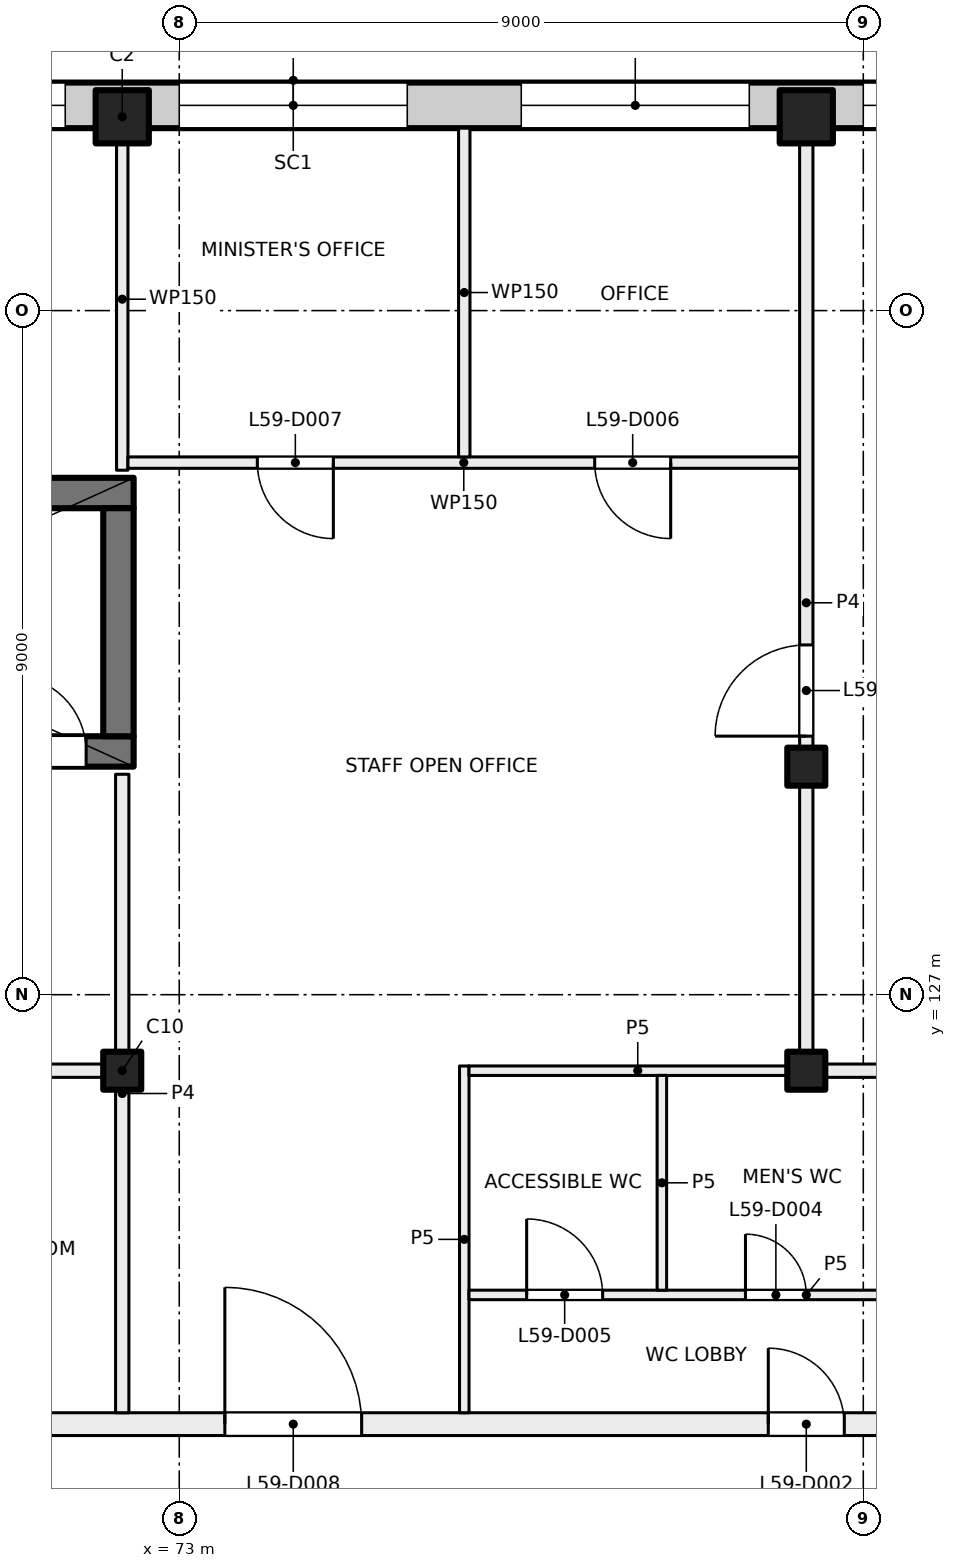
"""IFC4 building model, lengths in metres.
Left out: names, types, materials, properties, quantities, classifications, styles, units other than length and angle.
Written with IfcOpenShell. Run it as: python <this file> out.ifc"""

import sys

from ifc_helpers import new_model, si_unit, direction, frame, frame_2d, origin, origin_2d, place, context, subcontext, project, spatial, rectangle, extrude, element, fill, save


model = new_model("IFC4")
c1 = context("Model", 3, precision=1e-05, world=origin(), true_north=direction((0.0, 1.0)))
c2 = subcontext(c1, "Body", "Model", "MODEL_VIEW")
j1 = project(units=[si_unit("LENGTHUNIT", "METRE"), si_unit("PLANEANGLEUNIT", "RADIAN")], contexts=[c1])
p1 = place(None, origin())
s1 = spatial("IfcSite", under=j1, at=p1, CompositionType="ELEMENT")
p2 = place(p1, origin())
s2 = spatial("IfcBuilding", under=s1, at=p2, CompositionType="ELEMENT")
p3 = place(p2, frame((0.0, 0.0, 249.5)))
s3 = spatial("IfcBuildingStorey", under=s2, at=p3, CompositionType="ELEMENT", Elevation=249.5)
for number, where, z_axis, x_axis in (
    (1, (81.25, 130.0, 0.0), (0.0, 0.0, 1.0), (1.0, 0.0, 0.0)),
    (2, (72.25, 126.0, 0.0), (0.0, 0.0, 1.0), (1.0, 0.0, 0.0)),
    (3, (81.25, 126.0, 0.0), (0.0, 0.0, 1.0), (1.0, 0.0, 0.0)),
):
    element("IfcColumn", number, at=place(p3, frame(where, z_axis=z_axis, x_axis=x_axis)), inside=s3, PredefinedType="COLUMN", context=c2, shape_type="SweptSolid", body=[
        extrude(rectangle(XDim=0.5, YDim=0.5, at=origin_2d()), origin(), (0.0, 0.0, 1.0), 4.0),
    ])
for number, where, z_axis, x_axis in (
    (4, (72.25, 138.55, 0.0), (0.0, 0.0, 1.0), (1.0, 0.0, 0.0)),
    (5, (81.25, 138.55, 0.0), (0.0, 0.0, 1.0), (1.0, 0.0, 0.0)),
):
    element("IfcColumn", number, at=place(p3, frame(where, z_axis=z_axis, x_axis=x_axis)), inside=s3, PredefinedType="COLUMN", context=c2, shape_type="SweptSolid", body=[
        extrude(rectangle(XDim=0.7, YDim=0.7, at=origin_2d()), origin(), (0.0, 0.0, 1.0), 4.0),
    ])
p4 = place(p3, frame((63.5, 130.2, 0.0), z_axis=(0.0, 0.0, 1.0), x_axis=(1.0, 0.0, 0.0)))
e6 = element("IfcWall", 6, at=p4, inside=s3, PredefinedType="SHEAR", context=c2, shape_type="SweptSolid", body=[
    extrude(rectangle(XDim=8.9, YDim=0.4, at=frame_2d((4.45, 0.0))), origin(), (0.0, 0.0, 1.0), 4.0),
])
p5 = place(p4, frame((7.275, 0.0, 0.0)))
e7 = element("IfcOpeningElement", 7, at=p5, cuts=e6, PredefinedType="OPENING", context=c2, shape_type="SweptSolid", body=[
    extrude(rectangle(XDim=1.0, YDim=2.1, at=frame_2d((0.5, 1.05))), frame((0.0, 0.21, 0.0), z_axis=(0.0, -1.0, 0.0), x_axis=(1.0, 0.0, 0.0)), (0.0, 0.0, 1.0), 0.42),
])
p6 = place(p3, frame((64.0, 133.6, 0.0), z_axis=(0.0, 0.0, 1.0), x_axis=(1.0, 0.0, 0.0)))
e8 = element("IfcWall", 8, at=p6, inside=s3, PredefinedType="SHEAR", context=c2, shape_type="SweptSolid", body=[
    extrude(rectangle(XDim=8.4, YDim=0.4, at=frame_2d((4.2, 0.0))), origin(), (0.0, 0.0, 1.0), 4.0),
])
p7 = place(p3, frame((72.2, 130.4, 0.0), z_axis=(0.0, 0.0, 1.0), x_axis=(0.0, 1.0, 0.0)))
e9 = element("IfcWall", 9, at=p7, inside=s3, PredefinedType="SHEAR", context=c2, shape_type="SweptSolid", body=[
    extrude(rectangle(XDim=3.0, YDim=0.4, at=frame_2d((1.5, 0.0))), origin(), (0.0, 0.0, 1.0), 4.0),
])
p8 = place(p3, frame((47.07, 138.7, 0.0), z_axis=(0.0, 0.0, 1.0), x_axis=(1.0, 0.0, 0.0)))
e10 = element("IfcWall", 10, at=p8, inside=s3, PredefinedType="SOLIDWALL", context=c2, shape_type="SweptSolid", body=[
    extrude(rectangle(XDim=43.91, YDim=0.6, at=frame_2d((21.955, 0.0))), origin(), (0.0, 0.0, 1.0), 3.625),
])
p9 = place(p8, frame((3.43, 0.0, 0.9)))
e11 = element("IfcOpeningElement", 11, at=p9, cuts=e10, PredefinedType="OPENING", context=c2, shape_type="SweptSolid", body=[
    extrude(rectangle(XDim=3.0, YDim=2.4, at=frame_2d((1.5, 1.2))), frame((0.0, 0.31, 0.0), z_axis=(0.0, -1.0, 0.0), x_axis=(1.0, 0.0, 0.0)), (0.0, 0.0, 1.0), 0.62),
])
p10 = place(p8, frame((7.93, 0.0, 0.9)))
e12 = element("IfcOpeningElement", 12, at=p10, cuts=e10, PredefinedType="OPENING", context=c2, shape_type="SweptSolid", body=[
    extrude(rectangle(XDim=3.0, YDim=2.4, at=frame_2d((1.5, 1.2))), frame((0.0, 0.31, 0.0), z_axis=(0.0, -1.0, 0.0), x_axis=(1.0, 0.0, 0.0)), (0.0, 0.0, 1.0), 0.62),
])
p11 = place(p8, frame((12.43, 0.0, 0.9)))
e13 = element("IfcOpeningElement", 13, at=p11, cuts=e10, PredefinedType="OPENING", context=c2, shape_type="SweptSolid", body=[
    extrude(rectangle(XDim=3.0, YDim=2.4, at=frame_2d((1.5, 1.2))), frame((0.0, 0.31, 0.0), z_axis=(0.0, -1.0, 0.0), x_axis=(1.0, 0.0, 0.0)), (0.0, 0.0, 1.0), 0.62),
])
p12 = place(p8, frame((16.93, 0.0, 0.9)))
e14 = element("IfcOpeningElement", 14, at=p12, cuts=e10, PredefinedType="OPENING", context=c2, shape_type="SweptSolid", body=[
    extrude(rectangle(XDim=3.0, YDim=2.4, at=frame_2d((1.5, 1.2))), frame((0.0, 0.31, 0.0), z_axis=(0.0, -1.0, 0.0), x_axis=(1.0, 0.0, 0.0)), (0.0, 0.0, 1.0), 0.62),
])
p13 = place(p8, frame((21.43, 0.0, 0.9)))
e15 = element("IfcOpeningElement", 15, at=p13, cuts=e10, PredefinedType="OPENING", context=c2, shape_type="SweptSolid", body=[
    extrude(rectangle(XDim=3.0, YDim=2.4, at=frame_2d((1.5, 1.2))), frame((0.0, 0.31, 0.0), z_axis=(0.0, -1.0, 0.0), x_axis=(1.0, 0.0, 0.0)), (0.0, 0.0, 1.0), 0.62),
])
p14 = place(p8, frame((25.93, 0.0, 0.9)))
e16 = element("IfcOpeningElement", 16, at=p14, cuts=e10, PredefinedType="OPENING", context=c2, shape_type="SweptSolid", body=[
    extrude(rectangle(XDim=3.0, YDim=2.4, at=frame_2d((1.5, 1.2))), frame((0.0, 0.31, 0.0), z_axis=(0.0, -1.0, 0.0), x_axis=(1.0, 0.0, 0.0)), (0.0, 0.0, 1.0), 0.62),
])
p15 = place(p8, frame((30.43, 0.0, 0.9)))
e17 = element("IfcOpeningElement", 17, at=p15, cuts=e10, PredefinedType="OPENING", context=c2, shape_type="SweptSolid", body=[
    extrude(rectangle(XDim=3.0, YDim=2.4, at=frame_2d((1.5, 1.2))), frame((0.0, 0.31, 0.0), z_axis=(0.0, -1.0, 0.0), x_axis=(1.0, 0.0, 0.0)), (0.0, 0.0, 1.0), 0.62),
])
p16 = place(p8, frame((34.93, 0.0, 0.9)))
e18 = element("IfcOpeningElement", 18, at=p16, cuts=e10, PredefinedType="OPENING", context=c2, shape_type="SweptSolid", body=[
    extrude(rectangle(XDim=3.0, YDim=2.4, at=frame_2d((1.5, 1.2))), frame((0.0, 0.31, 0.0), z_axis=(0.0, -1.0, 0.0), x_axis=(1.0, 0.0, 0.0)), (0.0, 0.0, 1.0), 0.62),
])
p17 = place(p8, frame((39.43, 0.0, 0.9)))
e19 = element("IfcOpeningElement", 19, at=p17, cuts=e10, PredefinedType="OPENING", context=c2, shape_type="SweptSolid", body=[
    extrude(rectangle(XDim=3.0, YDim=2.4, at=frame_2d((1.5, 1.2))), frame((0.0, 0.31, 0.0), z_axis=(0.0, -1.0, 0.0), x_axis=(1.0, 0.0, 0.0)), (0.0, 0.0, 1.0), 0.62),
])
p18 = place(p3, frame((54.4, 121.35, 0.0), z_axis=(0.0, 0.0, 1.0), x_axis=(1.0, 0.0, 0.0)))
e20 = element("IfcWall", 20, at=p18, inside=s3, PredefinedType="PARTITIONING", context=c2, shape_type="SweptSolid", body=[
    extrude(rectangle(XDim=31.412, YDim=0.3, at=frame_2d((15.706, 0.0))), origin(), (0.0, 0.0, 1.0), 3.625),
])
p19 = place(p18, frame((26.35, 0.0, 0.0)))
e21 = element("IfcOpeningElement", 21, at=p19, cuts=e20, PredefinedType="OPENING", context=c2, shape_type="SweptSolid", body=[
    extrude(rectangle(XDim=1.0, YDim=2.1, at=frame_2d((0.5, 1.05))), frame((0.0, 0.16, 0.0), z_axis=(0.0, -1.0, 0.0), x_axis=(1.0, 0.0, 0.0)), (0.0, 0.0, 1.0), 0.32),
])
p20 = place(p18, frame((19.2, 0.0, 0.0)))
e22 = element("IfcOpeningElement", 22, at=p20, cuts=e20, PredefinedType="OPENING", context=c2, shape_type="SweptSolid", body=[
    extrude(rectangle(XDim=1.8, YDim=2.1, at=frame_2d((0.9, 1.05))), frame((0.0, 0.16, 0.0), z_axis=(0.0, -1.0, 0.0), x_axis=(1.0, 0.0, 0.0)), (0.0, 0.0, 1.0), 0.32),
])
p21 = place(p18, frame((15.0, 0.0, 0.0)))
e23 = element("IfcOpeningElement", 23, at=p21, cuts=e20, PredefinedType="OPENING", context=c2, shape_type="SweptSolid", body=[
    extrude(rectangle(XDim=1.2, YDim=2.1, at=frame_2d((0.6, 1.05))), frame((0.0, 0.16, 0.0), z_axis=(0.0, -1.0, 0.0), x_axis=(1.0, 0.0, 0.0)), (0.0, 0.0, 1.0), 0.32),
])
p22 = place(p18, frame((11.45, 0.0, 0.0)))
e24 = element("IfcOpeningElement", 24, at=p22, cuts=e20, PredefinedType="OPENING", context=c2, shape_type="SweptSolid", body=[
    extrude(rectangle(XDim=0.8, YDim=2.1, at=frame_2d((0.4, 1.05))), frame((0.0, 0.16, 0.0), z_axis=(0.0, -1.0, 0.0), x_axis=(1.0, 0.0, 0.0)), (0.0, 0.0, 1.0), 0.32),
])
p23 = place(p18, frame((3.515, 0.0, 0.0)))
e25 = element("IfcOpeningElement", 25, at=p23, cuts=e20, PredefinedType="OPENING", context=c2, shape_type="SweptSolid", body=[
    extrude(rectangle(XDim=1.8, YDim=2.1, at=frame_2d((0.9, 1.05))), frame((0.0, 0.16, 0.0), z_axis=(0.0, -1.0, 0.0), x_axis=(1.0, 0.0, 0.0)), (0.0, 0.0, 1.0), 0.32),
])
p24 = place(p3, frame((64.662, 126.0, 0.0), z_axis=(0.0, 0.0, 1.0), x_axis=(1.0, 0.0, 0.0)))
e26 = element("IfcWall", 26, at=p24, inside=s3, PredefinedType="PARTITIONING", context=c2, shape_type="SweptSolid", body=[
    extrude(rectangle(XDim=7.5, YDim=0.175, at=frame_2d((3.75, 0.0))), origin(), (0.0, 0.0, 1.0), 3.625),
])
p25 = place(p3, frame((72.25, 121.5, 0.0), z_axis=(0.0, 0.0, 1.0), x_axis=(0.0, 1.0, 0.0)))
e27 = element("IfcWall", 27, at=p25, inside=s3, PredefinedType="PARTITIONING", context=c2, shape_type="SweptSolid", body=[
    extrude(rectangle(XDim=8.4, YDim=0.175, at=frame_2d((4.2, 0.0))), origin(), (0.0, 0.0, 1.0), 3.625),
])
p26 = place(p3, frame((72.25, 133.9, 0.0), z_axis=(0.0, 0.0, 1.0), x_axis=(0.0, 1.0, 0.0)))
e28 = element("IfcWall", 28, at=p26, inside=s3, PredefinedType="PARTITIONING", context=c2, shape_type="SweptSolid", body=[
    extrude(rectangle(XDim=4.5, YDim=0.15, at=frame_2d((2.25, 0.0))), origin(), (0.0, 0.0, 1.0), 3.625),
])
p27 = place(p3, frame((81.162, 134.0, 0.0), z_axis=(0.0, 0.0, 1.0), x_axis=(-1.0, 0.0, 0.0)))
e29 = element("IfcWall", 29, at=p27, inside=s3, PredefinedType="PARTITIONING", context=c2, shape_type="SweptSolid", body=[
    extrude(rectangle(XDim=8.837, YDim=0.15, at=frame_2d((4.418, 0.0))), origin(), (0.0, 0.0, 1.0), 3.625),
])
p28 = place(p27, frame((1.696, 0.0, 0.0)))
e30 = element("IfcOpeningElement", 30, at=p28, cuts=e29, PredefinedType="OPENING", context=c2, shape_type="SweptSolid", body=[
    extrude(rectangle(XDim=1.0, YDim=2.1, at=frame_2d((0.5, 1.05))), frame((0.0, 0.085, 0.0), z_axis=(0.0, -1.0, 0.0), x_axis=(1.0, 0.0, 0.0)), (0.0, 0.0, 1.0), 0.17),
])
p29 = place(p27, frame((6.135, 0.0, 0.0)))
e31 = element("IfcOpeningElement", 31, at=p29, cuts=e29, PredefinedType="OPENING", context=c2, shape_type="SweptSolid", body=[
    extrude(rectangle(XDim=1.0, YDim=2.1, at=frame_2d((0.5, 1.05))), frame((0.0, 0.085, 0.0), z_axis=(0.0, -1.0, 0.0), x_axis=(1.0, 0.0, 0.0)), (0.0, 0.0, 1.0), 0.17),
])
p30 = place(p3, frame((76.75, 121.5, 0.0), z_axis=(0.0, 0.0, 1.0), x_axis=(0.0, 1.0, 0.0)))
e32 = element("IfcWall", 32, at=p30, inside=s3, PredefinedType="PARTITIONING", context=c2, shape_type="SweptSolid", body=[
    extrude(rectangle(XDim=4.562, YDim=0.125, at=frame_2d((2.281, 0.0))), origin(), (0.0, 0.0, 1.0), 3.625),
])
p31 = place(p3, frame((76.812, 123.05, 0.0), z_axis=(0.0, 0.0, 1.0), x_axis=(1.0, 0.0, 0.0)))
e33 = element("IfcWall", 33, at=p31, inside=s3, PredefinedType="PARTITIONING", context=c2, shape_type="SweptSolid", body=[
    extrude(rectangle(XDim=8.876, YDim=0.125, at=frame_2d((4.438, 0.0))), origin(), (0.0, 0.0, 1.0), 3.625),
])
p32 = place(p31, frame((6.817, 0.0, 0.0)))
e34 = element("IfcOpeningElement", 34, at=p32, cuts=e33, PredefinedType="OPENING", context=c2, shape_type="SweptSolid", body=[
    extrude(rectangle(XDim=0.8, YDim=2.1, at=frame_2d((0.4, 1.05))), frame((0.0, 0.073, 0.0), z_axis=(0.0, -1.0, 0.0), x_axis=(1.0, 0.0, 0.0)), (0.0, 0.0, 1.0), 0.145),
])
p33 = place(p31, frame((3.638, 0.0, 0.0)))
e35 = element("IfcOpeningElement", 35, at=p33, cuts=e33, PredefinedType="OPENING", context=c2, shape_type="SweptSolid", body=[
    extrude(rectangle(XDim=0.8, YDim=2.1, at=frame_2d((0.4, 1.05))), frame((0.0, 0.073, 0.0), z_axis=(0.0, -1.0, 0.0), x_axis=(1.0, 0.0, 0.0)), (0.0, 0.0, 1.0), 0.145),
])
p34 = place(p31, frame((0.759, 0.0, 0.0)))
e36 = element("IfcOpeningElement", 36, at=p34, cuts=e33, PredefinedType="OPENING", context=c2, shape_type="SweptSolid", body=[
    extrude(rectangle(XDim=1.0, YDim=2.1, at=frame_2d((0.5, 1.05))), frame((0.0, 0.073, 0.0), z_axis=(0.0, -1.0, 0.0), x_axis=(1.0, 0.0, 0.0)), (0.0, 0.0, 1.0), 0.145),
])
p35 = place(p3, frame((76.812, 126.0, 0.0), z_axis=(0.0, 0.0, 1.0), x_axis=(1.0, 0.0, 0.0)))
e37 = element("IfcWall", 37, at=p35, inside=s3, PredefinedType="PARTITIONING", context=c2, shape_type="SweptSolid", body=[
    extrude(rectangle(XDim=4.441, YDim=0.125, at=frame_2d((2.22, 0.0))), origin(), (0.0, 0.0, 1.0), 3.625),
])
p36 = place(p3, frame((76.75, 134.075, 0.0), z_axis=(0.0, 0.0, 1.0), x_axis=(0.0, 1.0, 0.0)))
e38 = element("IfcWall", 38, at=p36, inside=s3, PredefinedType="PARTITIONING", context=c2, shape_type="SweptSolid", body=[
    extrude(rectangle(XDim=4.325, YDim=0.15, at=frame_2d((2.163, 0.0))), origin(), (0.0, 0.0, 1.0), 3.625),
])
p37 = place(p3, frame((79.35, 125.938, 0.0), z_axis=(0.0, 0.0, 1.0), x_axis=(0.0, -1.0, 0.0)))
e39 = element("IfcWall", 39, at=p37, inside=s3, PredefinedType="PARTITIONING", context=c2, shape_type="SweptSolid", body=[
    extrude(rectangle(XDim=2.826, YDim=0.125, at=frame_2d((1.413, 0.0))), origin(), (0.0, 0.0, 1.0), 3.625),
])
p38 = place(p3, frame((81.338, 126.0, 0.0), z_axis=(0.0, 0.0, 1.0), x_axis=(1.0, 0.0, 0.0)))
e40 = element("IfcWall", 40, at=p38, inside=s3, PredefinedType="PARTITIONING", context=c2, shape_type="SweptSolid", body=[
    extrude(rectangle(XDim=4.324, YDim=0.175, at=frame_2d((2.162, 0.0))), origin(), (0.0, 0.0, 1.0), 3.625),
])
p39 = place(p3, frame((81.25, 125.912, 0.0), z_axis=(0.0, 0.0, 1.0), x_axis=(0.0, 1.0, 0.0)))
e41 = element("IfcWall", 41, at=p39, inside=s3, PredefinedType="PARTITIONING", context=c2, shape_type="SweptSolid", body=[
    extrude(rectangle(XDim=12.488, YDim=0.175, at=frame_2d((6.244, 0.0))), origin(), (0.0, 0.0, 1.0), 3.625),
])
p40 = place(p39, frame((4.49, 0.0, 0.0)))
e42 = element("IfcOpeningElement", 42, at=p40, cuts=e41, PredefinedType="OPENING", context=c2, shape_type="SweptSolid", body=[
    extrude(rectangle(XDim=1.2, YDim=2.1, at=frame_2d((0.6, 1.05))), frame((0.0, 0.097, 0.0), z_axis=(0.0, -1.0, 0.0), x_axis=(1.0, 0.0, 0.0)), (0.0, 0.0, 1.0), 0.195),
])
p41 = place(p13, origin())
e43 = element("IfcWindow", 43, at=p41, inside=s3, PartitioningType="SINGLE_PANEL", PredefinedType="WINDOW", context=c2, shape_type="SweptSolid", body=[
    extrude(rectangle(XDim=3.0, YDim=2.4, at=frame_2d((1.5, 1.2))), frame((0.0, 0.03, 0.0), z_axis=(0.0, -1.0, 0.0), x_axis=(1.0, 0.0, 0.0)), (0.0, 0.0, 1.0), 0.06),
])
fill(e15, e43)
p42 = place(p14, origin())
e44 = element("IfcWindow", 44, at=p42, inside=s3, PartitioningType="SINGLE_PANEL", PredefinedType="WINDOW", context=c2, shape_type="SweptSolid", body=[
    extrude(rectangle(XDim=3.0, YDim=2.4, at=frame_2d((1.5, 1.2))), frame((0.0, 0.03, 0.0), z_axis=(0.0, -1.0, 0.0), x_axis=(1.0, 0.0, 0.0)), (0.0, 0.0, 1.0), 0.06),
])
fill(e16, e44)
p43 = place(p15, origin())
e45 = element("IfcWindow", 45, at=p43, inside=s3, PartitioningType="SINGLE_PANEL", PredefinedType="WINDOW", context=c2, shape_type="SweptSolid", body=[
    extrude(rectangle(XDim=3.0, YDim=2.4, at=frame_2d((1.5, 1.2))), frame((0.0, 0.03, 0.0), z_axis=(0.0, -1.0, 0.0), x_axis=(1.0, 0.0, 0.0)), (0.0, 0.0, 1.0), 0.06),
])
fill(e17, e45)
p44 = place(p16, origin())
e46 = element("IfcWindow", 46, at=p44, inside=s3, PartitioningType="SINGLE_PANEL", PredefinedType="WINDOW", context=c2, shape_type="SweptSolid", body=[
    extrude(rectangle(XDim=3.0, YDim=2.4, at=frame_2d((1.5, 1.2))), frame((0.0, 0.03, 0.0), z_axis=(0.0, -1.0, 0.0), x_axis=(1.0, 0.0, 0.0)), (0.0, 0.0, 1.0), 0.06),
])
fill(e18, e46)
p45 = place(p5, origin())
e47 = element("IfcDoor", 47, at=p45, inside=s3, OperationType="SINGLE_SWING_LEFT", PredefinedType="DOOR", context=c2, shape_type="SweptSolid", body=[
    extrude(rectangle(XDim=1.0, YDim=2.1, at=frame_2d((0.5, 1.05))), frame((0.0, 0.025, 0.0), z_axis=(0.0, -1.0, 0.0), x_axis=(1.0, 0.0, 0.0)), (0.0, 0.0, 1.0), 0.05),
])
fill(e7, e47)
p46 = place(p19, origin())
e48 = element("IfcDoor", 48, at=p46, inside=s3, OperationType="SINGLE_SWING_LEFT", PredefinedType="DOOR", context=c2, shape_type="SweptSolid", body=[
    extrude(rectangle(XDim=1.0, YDim=2.1, at=frame_2d((0.5, 1.05))), frame((0.0, 0.025, 0.0), z_axis=(0.0, -1.0, 0.0), x_axis=(1.0, 0.0, 0.0)), (0.0, 0.0, 1.0), 0.05),
])
fill(e21, e48)
p47 = place(p33, origin())
e49 = element("IfcDoor", 49, at=p47, inside=s3, OperationType="SINGLE_SWING_LEFT", PredefinedType="DOOR", context=c2, shape_type="SweptSolid", body=[
    extrude(rectangle(XDim=0.8, YDim=2.1, at=frame_2d((0.4, 1.05))), frame((0.0, 0.025, 0.0), z_axis=(0.0, -1.0, 0.0), x_axis=(1.0, 0.0, 0.0)), (0.0, 0.0, 1.0), 0.05),
])
fill(e35, e49)
p48 = place(p34, origin())
e50 = element("IfcDoor", 50, at=p48, inside=s3, OperationType="SINGLE_SWING_LEFT", PredefinedType="DOOR", context=c2, shape_type="SweptSolid", body=[
    extrude(rectangle(XDim=1.0, YDim=2.1, at=frame_2d((0.5, 1.05))), frame((0.0, 0.025, 0.0), z_axis=(0.0, -1.0, 0.0), x_axis=(1.0, 0.0, 0.0)), (0.0, 0.0, 1.0), 0.05),
])
fill(e36, e50)
p49 = place(p28, origin())
e51 = element("IfcDoor", 51, at=p49, inside=s3, OperationType="SINGLE_SWING_LEFT", PredefinedType="DOOR", context=c2, shape_type="SweptSolid", body=[
    extrude(rectangle(XDim=1.0, YDim=2.1, at=frame_2d((0.5, 1.05))), frame((0.0, 0.025, 0.0), z_axis=(0.0, -1.0, 0.0), x_axis=(1.0, 0.0, 0.0)), (0.0, 0.0, 1.0), 0.05),
])
fill(e30, e51)
p50 = place(p29, origin())
e52 = element("IfcDoor", 52, at=p50, inside=s3, OperationType="SINGLE_SWING_RIGHT", PredefinedType="DOOR", context=c2, shape_type="SweptSolid", body=[
    extrude(rectangle(XDim=1.0, YDim=2.1, at=frame_2d((0.5, 1.05))), frame((0.0, 0.025, 0.0), z_axis=(0.0, -1.0, 0.0), x_axis=(1.0, 0.0, 0.0)), (0.0, 0.0, 1.0), 0.05),
])
fill(e31, e52)
p51 = place(p20, origin())
e53 = element("IfcDoor", 53, at=p51, inside=s3, OperationType="DOUBLE_DOOR_SINGLE_SWING", PredefinedType="DOOR", context=c2, shape_type="SweptSolid", body=[
    extrude(rectangle(XDim=1.8, YDim=2.1, at=frame_2d((0.9, 1.05))), frame((0.0, 0.025, 0.0), z_axis=(0.0, -1.0, 0.0), x_axis=(1.0, 0.0, 0.0)), (0.0, 0.0, 1.0), 0.05),
])
fill(e22, e53)
p52 = place(p40, origin())
e54 = element("IfcDoor", 54, at=p52, inside=s3, OperationType="DOUBLE_DOOR_SINGLE_SWING", PredefinedType="DOOR", context=c2, shape_type="SweptSolid", body=[
    extrude(rectangle(XDim=1.2, YDim=2.1, at=frame_2d((0.6, 1.05))), frame((0.0, 0.025, 0.0), z_axis=(0.0, -1.0, 0.0), x_axis=(1.0, 0.0, 0.0)), (0.0, 0.0, 1.0), 0.05),
])
fill(e42, e54)
save(model, sys.argv[1])
